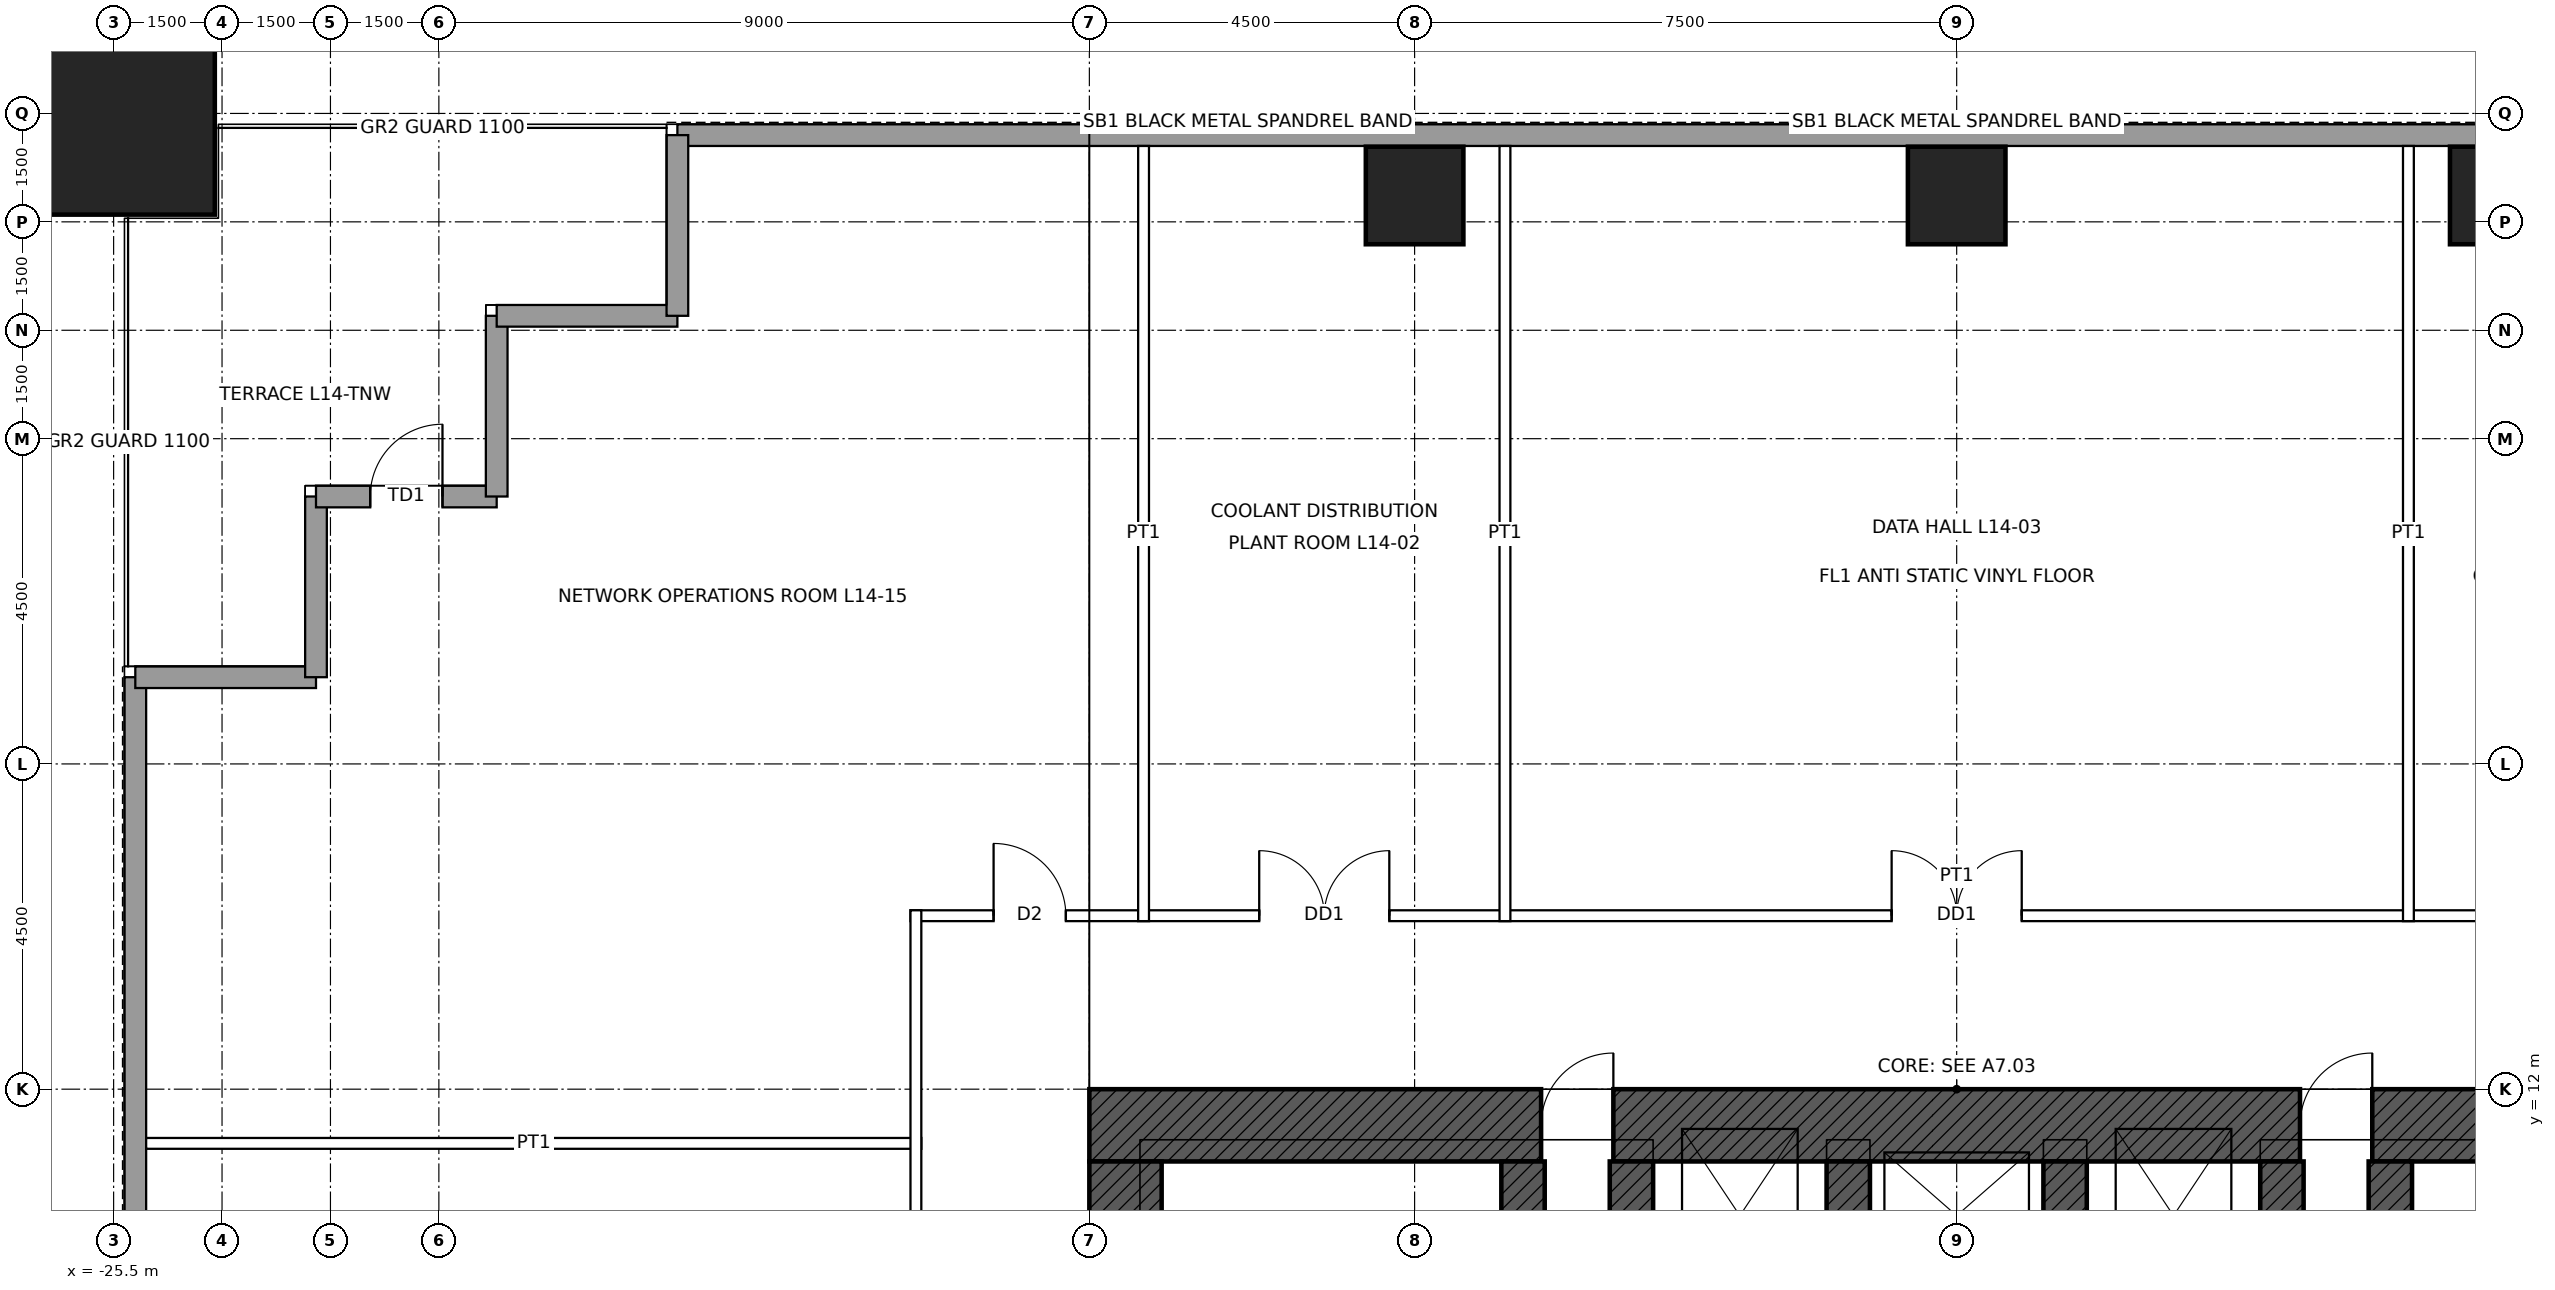
"""IFC4 building model, lengths in metres.
Left out: names, types, materials, properties, quantities, classifications, styles, units other than length and angle.
Written with IfcOpenShell. Run it as: python <this file> out.ifc"""

import sys

from ifc_helpers import new_model, si_unit, direction, frame, frame_2d, origin, origin_2d, place, context, subcontext, project, spatial, rectangle, hollow_rectangle, extrude, element, fill, save


model = new_model("IFC4")
c1 = context("Model", 3, precision=1e-05, world=origin(), true_north=direction((0.0, 1.0)))
c2 = subcontext(c1, "Body", "Model", "MODEL_VIEW")
j1 = project(units=[si_unit("LENGTHUNIT", "METRE"), si_unit("PLANEANGLEUNIT", "RADIAN")], contexts=[c1])
p1 = place(None, origin())
s1 = spatial("IfcSite", under=j1, at=p1, CompositionType="ELEMENT")
p2 = place(p1, origin())
s2 = spatial("IfcBuilding", under=s1, at=p2, CompositionType="ELEMENT")
p3 = place(p2, frame((0.0, 0.0, 73.4)))
s3 = spatial("IfcBuildingStorey", under=s2, at=p3, CompositionType="ELEMENT", Elevation=73.4)
p4 = place(p3, frame((-25.5, 25.5, 0.0), z_axis=(0.0, 0.0, 1.0), x_axis=(1.0, 0.0, 0.0)))
e1 = element("IfcColumn", 1, at=p4, inside=s3, PredefinedType="COLUMN", context=c2, shape_type="SweptSolid", body=[
    extrude(hollow_rectangle(XDim=2.8, YDim=2.8, WallThickness=0.14, at=origin_2d()), origin(), (0.0, 0.0, 1.0), 5.0),
])
for number, where, z_axis, x_axis in (
    (2, (-7.5, 24.365, 0.0), (0.0, 0.0, 1.0), (1.0, 0.0, 0.0)),
    (3, (0.0, 24.365, 0.0), (0.0, 0.0, 1.0), (1.0, 0.0, 0.0)),
    (4, (7.5, 24.365, 0.0), (0.0, 0.0, 1.0), (1.0, 0.0, 0.0)),
):
    element("IfcColumn", number, at=place(p3, frame(where, z_axis=z_axis, x_axis=x_axis)), inside=s3, PredefinedType="COLUMN", context=c2, shape_type="SweptSolid", body=[
        extrude(hollow_rectangle(XDim=1.35, YDim=1.35, WallThickness=0.085, at=origin_2d()), origin(), (0.0, 0.0, 1.0), 5.0),
    ])
p5 = place(p3, frame((-12.0, 11.5, 0.0), z_axis=(0.0, 0.0, 1.0), x_axis=(1.0, 0.0, 0.0)))
e5 = element("IfcWall", 5, at=p5, inside=s3, PredefinedType="SHEAR", context=c2, shape_type="SweptSolid", body=[
    extrude(rectangle(XDim=24.0, YDim=1.0, at=frame_2d((12.0, 0.0))), origin(), (0.0, 0.0, 1.0), 5.0),
])
p6 = place(p5, frame((6.25, 0.0, 0.0)))
e6 = element("IfcOpeningElement", 6, at=p6, cuts=e5, PredefinedType="OPENING", context=c2, shape_type="SweptSolid", body=[
    extrude(rectangle(XDim=1.0, YDim=2.4, at=frame_2d((0.5, 1.2))), frame((0.0, 0.51, 0.0), z_axis=(0.0, -1.0, 0.0), x_axis=(1.0, 0.0, 0.0)), (0.0, 0.0, 1.0), 1.02),
])
p7 = place(p5, frame((16.75, 0.0, 0.0)))
e7 = element("IfcOpeningElement", 7, at=p7, cuts=e5, PredefinedType="OPENING", context=c2, shape_type="SweptSolid", body=[
    extrude(rectangle(XDim=1.0, YDim=2.4, at=frame_2d((0.5, 1.2))), frame((0.0, 0.51, 0.0), z_axis=(0.0, -1.0, 0.0), x_axis=(1.0, 0.0, 0.0)), (0.0, 0.0, 1.0), 1.02),
])
p8 = place(p3, frame((-11.5, -11.0, 0.0), z_axis=(0.0, 0.0, 1.0), x_axis=(0.0, 1.0, 0.0)))
e8 = element("IfcWall", 8, at=p8, inside=s3, PredefinedType="SHEAR", context=c2, shape_type="SweptSolid", body=[
    extrude(rectangle(XDim=22.0, YDim=1.0, at=frame_2d((11.0, 0.0))), origin(), (0.0, 0.0, 1.0), 5.0),
])
p9 = place(p8, frame((10.5, 0.0, 0.0)))
e9 = element("IfcOpeningElement", 9, at=p9, cuts=e8, PredefinedType="OPENING", context=c2, shape_type="SweptSolid", body=[
    extrude(rectangle(XDim=1.0, YDim=2.4, at=frame_2d((0.5, 1.2))), frame((0.0, 0.51, 0.0), z_axis=(0.0, -1.0, 0.0), x_axis=(1.0, 0.0, 0.0)), (0.0, 0.0, 1.0), 1.02),
])
p10 = place(p3, frame((-6.0, 4.5, 0.0), z_axis=(0.0, 0.0, 1.0), x_axis=(0.0, 1.0, 0.0)))
e10 = element("IfcWall", 10, at=p10, inside=s3, PredefinedType="SHEAR", context=c2, shape_type="SweptSolid", body=[
    extrude(rectangle(XDim=6.5, YDim=0.6, at=frame_2d((3.25, 0.0))), origin(), (0.0, 0.0, 1.0), 5.0),
])
p11 = place(p10, frame((0.6, 0.0, 0.0)))
e11 = element("IfcOpeningElement", 11, at=p11, cuts=e10, PredefinedType="OPENING", context=c2, shape_type="SweptSolid", body=[
    extrude(rectangle(XDim=1.0, YDim=2.1, at=frame_2d((0.5, 1.05))), frame((0.0, 0.31, 0.0), z_axis=(0.0, -1.0, 0.0), x_axis=(1.0, 0.0, 0.0)), (0.0, 0.0, 1.0), 0.62),
])
p12 = place(p3, frame((6.0, 4.5, 0.0), z_axis=(0.0, 0.0, 1.0), x_axis=(0.0, 1.0, 0.0)))
e12 = element("IfcWall", 12, at=p12, inside=s3, PredefinedType="SHEAR", context=c2, shape_type="SweptSolid", body=[
    extrude(rectangle(XDim=6.5, YDim=0.6, at=frame_2d((3.25, 0.0))), origin(), (0.0, 0.0, 1.0), 5.0),
])
p13 = place(p12, frame((0.6, 0.0, 0.0)))
e13 = element("IfcOpeningElement", 13, at=p13, cuts=e12, PredefinedType="OPENING", context=c2, shape_type="SweptSolid", body=[
    extrude(rectangle(XDim=1.0, YDim=2.1, at=frame_2d((0.5, 1.05))), frame((0.0, 0.31, 0.0), z_axis=(0.0, -1.0, 0.0), x_axis=(1.0, 0.0, 0.0)), (0.0, 0.0, 1.0), 0.62),
])
for number, where, z_axis, x_axis in (
    (14, (-4.5, 8.5, 0.0), (0.0, 0.0, 1.0), (0.0, 1.0, 0.0)),
    (15, (4.5, 8.5, 0.0), (0.0, 0.0, 1.0), (0.0, 1.0, 0.0)),
    (16, (-1.5, 8.5, 0.0), (0.0, 0.0, 1.0), (0.0, 1.0, 0.0)),
    (17, (1.5, 8.5, 0.0), (0.0, 0.0, 1.0), (0.0, 1.0, 0.0)),
):
    element("IfcWall", number, at=place(p3, frame(where, z_axis=z_axis, x_axis=x_axis)), inside=s3, PredefinedType="SHEAR", context=c2, shape_type="SweptSolid", body=[
        extrude(rectangle(XDim=2.5, YDim=0.6, at=frame_2d((1.25, 0.0))), origin(), (0.0, 0.0, 1.0), 5.0),
    ])
for number, where, z_axis, x_axis in (
    (18, (-17.7, 25.2, 0.0), (0.0, 0.0, 1.0), (1.0, 0.0, 0.0)),
    (19, (-25.2, -17.7, 0.0), (0.0, 0.0, 1.0), (0.0, 1.0, 0.0)),
):
    element("IfcWall", number, at=place(p3, frame(where, z_axis=z_axis, x_axis=x_axis)), inside=s3, PredefinedType="SOLIDWALL", context=c2, shape_type="SweptSolid", body=[
        extrude(rectangle(XDim=35.4, YDim=0.3, at=frame_2d((17.7, 0.0))), origin(), (0.0, 0.0, 1.0), 4.8),
    ])
for number, where, z_axis, x_axis in (
    (20, (-25.2, 17.7, 0.0), (0.0, 0.0, 1.0), (1.0, 0.0, 0.0)),
    (21, (-22.7, 17.7, 0.0), (0.0, 0.0, 1.0), (0.0, 1.0, 0.0)),
):
    element("IfcWall", number, at=place(p3, frame(where, z_axis=z_axis, x_axis=x_axis)), inside=s3, PredefinedType="SOLIDWALL", context=c2, shape_type="SweptSolid", body=[
        extrude(rectangle(XDim=2.5, YDim=0.3, at=frame_2d((1.25, 0.0))), origin(), (0.0, 0.0, 1.0), 4.8),
    ])
p14 = place(p3, frame((-22.7, 20.2, 0.0), z_axis=(0.0, 0.0, 1.0), x_axis=(1.0, 0.0, 0.0)))
e22 = element("IfcWall", 22, at=p14, inside=s3, PredefinedType="SOLIDWALL", context=c2, shape_type="SweptSolid", body=[
    extrude(rectangle(XDim=2.5, YDim=0.3, at=frame_2d((1.25, 0.0))), origin(), (0.0, 0.0, 1.0), 4.8),
])
p15 = place(p14, frame((0.75, 0.0, 0.0)))
e23 = element("IfcOpeningElement", 23, at=p15, cuts=e22, PredefinedType="OPENING", context=c2, shape_type="SweptSolid", body=[
    extrude(rectangle(XDim=1.0, YDim=2.4, at=frame_2d((0.5, 1.2))), frame((0.0, 0.16, 0.0), z_axis=(0.0, -1.0, 0.0), x_axis=(1.0, 0.0, 0.0)), (0.0, 0.0, 1.0), 0.32),
])
for number, where, z_axis, x_axis in (
    (24, (-20.2, 20.2, 0.0), (0.0, 0.0, 1.0), (0.0, 1.0, 0.0)),
    (25, (-20.2, 22.7, 0.0), (0.0, 0.0, 1.0), (1.0, 0.0, 0.0)),
    (26, (-17.7, 22.7, 0.0), (0.0, 0.0, 1.0), (0.0, 1.0, 0.0)),
):
    element("IfcWall", number, at=place(p3, frame(where, z_axis=z_axis, x_axis=x_axis)), inside=s3, PredefinedType="SOLIDWALL", context=c2, shape_type="SweptSolid", body=[
        extrude(rectangle(XDim=2.5, YDim=0.3, at=frame_2d((1.25, 0.0))), origin(), (0.0, 0.0, 1.0), 4.8),
    ])
p16 = place(p3, frame((-25.05, 11.25, 0.0), z_axis=(0.0, 0.0, 1.0), x_axis=(1.0, 0.0, 0.0)))
e27 = element("IfcWall", 27, at=p16, inside=s3, PredefinedType="PARTITIONING", context=c2, shape_type="SweptSolid", body=[
    extrude(rectangle(XDim=10.725, YDim=0.15, at=frame_2d((5.363, 0.0))), origin(), (0.0, 0.0, 1.0), 3.853),
])
p17 = place(p3, frame((-14.475, 14.4, 0.0), z_axis=(0.0, 0.0, 1.0), x_axis=(1.0, 0.0, 0.0)))
e28 = element("IfcWall", 28, at=p17, inside=s3, PredefinedType="PARTITIONING", context=c2, shape_type="SweptSolid", body=[
    extrude(rectangle(XDim=28.95, YDim=0.15, at=frame_2d((14.475, 0.0))), origin(), (0.0, 0.0, 1.0), 4.8),
])
p18 = place(p17, frame((4.825, 0.0, 0.0)))
e29 = element("IfcOpeningElement", 29, at=p18, cuts=e28, PredefinedType="OPENING", context=c2, shape_type="SweptSolid", body=[
    extrude(rectangle(XDim=1.8, YDim=2.4, at=frame_2d((0.9, 1.2))), frame((0.0, 0.085, 0.0), z_axis=(0.0, -1.0, 0.0), x_axis=(1.0, 0.0, 0.0)), (0.0, 0.0, 1.0), 0.17),
])
p19 = place(p17, frame((13.575, 0.0, 0.0)))
e30 = element("IfcOpeningElement", 30, at=p19, cuts=e28, PredefinedType="OPENING", context=c2, shape_type="SweptSolid", body=[
    extrude(rectangle(XDim=1.8, YDim=2.4, at=frame_2d((0.9, 1.2))), frame((0.0, 0.085, 0.0), z_axis=(0.0, -1.0, 0.0), x_axis=(1.0, 0.0, 0.0)), (0.0, 0.0, 1.0), 0.17),
])
p20 = place(p17, frame((22.725, 0.0, 0.0)))
e31 = element("IfcOpeningElement", 31, at=p20, cuts=e28, PredefinedType="OPENING", context=c2, shape_type="SweptSolid", body=[
    extrude(rectangle(XDim=1.0, YDim=2.1, at=frame_2d((0.5, 1.05))), frame((0.0, 0.085, 0.0), z_axis=(0.0, -1.0, 0.0), x_axis=(1.0, 0.0, 0.0)), (0.0, 0.0, 1.0), 0.17),
])
p21 = place(p17, frame((26.8, 0.0, 0.0)))
e32 = element("IfcOpeningElement", 32, at=p21, cuts=e28, PredefinedType="OPENING", context=c2, shape_type="SweptSolid", body=[
    extrude(rectangle(XDim=1.0, YDim=2.1, at=frame_2d((0.5, 1.05))), frame((0.0, 0.085, 0.0), z_axis=(0.0, -1.0, 0.0), x_axis=(1.0, 0.0, 0.0)), (0.0, 0.0, 1.0), 0.17),
])
p22 = place(p17, frame((1.15, 0.0, 0.0)))
e33 = element("IfcOpeningElement", 33, at=p22, cuts=e28, PredefinedType="OPENING", context=c2, shape_type="SweptSolid", body=[
    extrude(rectangle(XDim=1.0, YDim=2.1, at=frame_2d((0.5, 1.05))), frame((0.0, 0.085, 0.0), z_axis=(0.0, -1.0, 0.0), x_axis=(1.0, 0.0, 0.0)), (0.0, 0.0, 1.0), 0.17),
])
p23 = place(p3, frame((-14.4, -14.475, 0.0), z_axis=(0.0, 0.0, 1.0), x_axis=(0.0, 1.0, 0.0)))
e34 = element("IfcWall", 34, at=p23, inside=s3, PredefinedType="PARTITIONING", context=c2, shape_type="SweptSolid", body=[
    extrude(rectangle(XDim=28.95, YDim=0.15, at=frame_2d((14.475, 0.0))), origin(), (0.0, 0.0, 1.0), 4.8),
])
p24 = place(p23, frame((4.825, 0.0, 0.0)))
e35 = element("IfcOpeningElement", 35, at=p24, cuts=e34, PredefinedType="OPENING", context=c2, shape_type="SweptSolid", body=[
    extrude(rectangle(XDim=1.8, YDim=2.4, at=frame_2d((0.9, 1.2))), frame((0.0, 0.085, 0.0), z_axis=(0.0, -1.0, 0.0), x_axis=(1.0, 0.0, 0.0)), (0.0, 0.0, 1.0), 0.17),
])
p25 = place(p23, frame((11.075, 0.0, 0.0)))
e36 = element("IfcOpeningElement", 36, at=p25, cuts=e34, PredefinedType="OPENING", context=c2, shape_type="SweptSolid", body=[
    extrude(rectangle(XDim=1.8, YDim=2.4, at=frame_2d((0.9, 1.2))), frame((0.0, 0.085, 0.0), z_axis=(0.0, -1.0, 0.0), x_axis=(1.0, 0.0, 0.0)), (0.0, 0.0, 1.0), 0.17),
])
p26 = place(p23, frame((20.225, 0.0, 0.0)))
e37 = element("IfcOpeningElement", 37, at=p26, cuts=e34, PredefinedType="OPENING", context=c2, shape_type="SweptSolid", body=[
    extrude(rectangle(XDim=1.0, YDim=2.1, at=frame_2d((0.5, 1.05))), frame((0.0, 0.085, 0.0), z_axis=(0.0, -1.0, 0.0), x_axis=(1.0, 0.0, 0.0)), (0.0, 0.0, 1.0), 0.17),
])
p27 = place(p3, frame((-11.25, 14.325, 0.0), z_axis=(0.0, 0.0, 1.0), x_axis=(0.0, 1.0, 0.0)))
e38 = element("IfcWall", 38, at=p27, inside=s3, PredefinedType="PARTITIONING", context=c2, shape_type="SweptSolid", body=[
    extrude(rectangle(XDim=10.725, YDim=0.15, at=frame_2d((5.363, 0.0))), origin(), (0.0, 0.0, 1.0), 3.853),
])
for number, where, z_axis, x_axis in (
    (39, (-6.25, 14.325, 0.0), (0.0, 0.0, 1.0), (0.0, 1.0, 0.0)),
    (40, (6.25, 14.325, 0.0), (0.0, 0.0, 1.0), (0.0, 1.0, 0.0)),
):
    element("IfcWall", number, at=place(p3, frame(where, z_axis=z_axis, x_axis=x_axis)), inside=s3, PredefinedType="PARTITIONING", context=c2, shape_type="SweptSolid", body=[
        extrude(rectangle(XDim=10.725, YDim=0.15, at=frame_2d((5.363, 0.0))), origin(), (0.0, 0.0, 1.0), 4.8),
    ])
p28 = place(p15, origin())
e41 = element("IfcDoor", 41, at=p28, inside=s3, OperationType="SINGLE_SWING_RIGHT", PredefinedType="DOOR", context=c2, shape_type="SweptSolid", body=[
    extrude(rectangle(XDim=1.0, YDim=2.4, at=frame_2d((0.5, 1.2))), frame((0.0, 0.025, 0.0), z_axis=(0.0, -1.0, 0.0), x_axis=(1.0, 0.0, 0.0)), (0.0, 0.0, 1.0), 0.05),
])
fill(e23, e41)
p29 = place(p6, origin())
e42 = element("IfcDoor", 42, at=p29, inside=s3, OperationType="SINGLE_SWING_RIGHT", PredefinedType="DOOR", context=c2, shape_type="SweptSolid", body=[
    extrude(rectangle(XDim=1.0, YDim=2.4, at=frame_2d((0.5, 1.2))), frame((0.0, 0.485, 0.0), z_axis=(0.0, -1.0, 0.0), x_axis=(1.0, 0.0, 0.0)), (0.0, 0.0, 1.0), 0.05),
])
fill(e6, e42)
p30 = place(p7, origin())
e43 = element("IfcDoor", 43, at=p30, inside=s3, OperationType="SINGLE_SWING_RIGHT", PredefinedType="DOOR", context=c2, shape_type="SweptSolid", body=[
    extrude(rectangle(XDim=1.0, YDim=2.4, at=frame_2d((0.5, 1.2))), frame((0.0, 0.485, 0.0), z_axis=(0.0, -1.0, 0.0), x_axis=(1.0, 0.0, 0.0)), (0.0, 0.0, 1.0), 0.05),
])
fill(e7, e43)
p31 = place(p18, origin())
e44 = element("IfcDoor", 44, at=p31, inside=s3, OperationType="DOUBLE_DOOR_SINGLE_SWING", PredefinedType="DOOR", context=c2, shape_type="SweptSolid", body=[
    extrude(rectangle(XDim=1.8, YDim=2.4, at=frame_2d((0.9, 1.2))), frame((0.0, 0.025, 0.0), z_axis=(0.0, -1.0, 0.0), x_axis=(1.0, 0.0, 0.0)), (0.0, 0.0, 1.0), 0.05),
])
fill(e29, e44)
p32 = place(p19, origin())
e45 = element("IfcDoor", 45, at=p32, inside=s3, OperationType="DOUBLE_DOOR_SINGLE_SWING", PredefinedType="DOOR", context=c2, shape_type="SweptSolid", body=[
    extrude(rectangle(XDim=1.8, YDim=2.4, at=frame_2d((0.9, 1.2))), frame((0.0, 0.025, 0.0), z_axis=(0.0, -1.0, 0.0), x_axis=(1.0, 0.0, 0.0)), (0.0, 0.0, 1.0), 0.05),
])
fill(e30, e45)
p33 = place(p22, origin())
e46 = element("IfcDoor", 46, at=p33, inside=s3, OperationType="SINGLE_SWING_LEFT", PredefinedType="DOOR", context=c2, shape_type="SweptSolid", body=[
    extrude(rectangle(XDim=1.0, YDim=2.1, at=frame_2d((0.5, 1.05))), frame((0.0, 0.025, 0.0), z_axis=(0.0, -1.0, 0.0), x_axis=(1.0, 0.0, 0.0)), (0.0, 0.0, 1.0), 0.05),
])
fill(e33, e46)
save(model, sys.argv[1])
